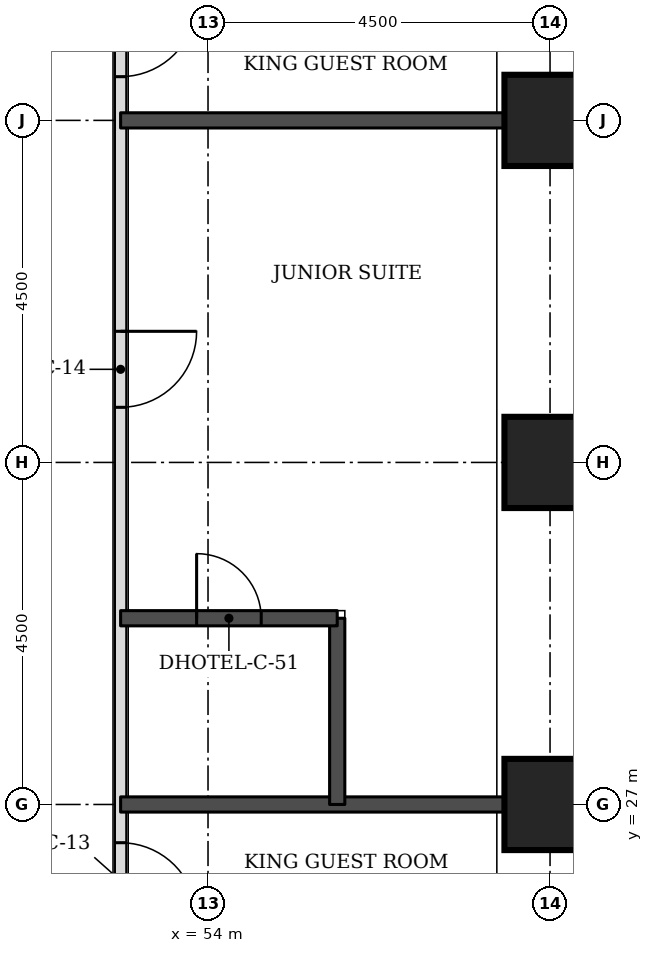
"""IFC4 building model, lengths in metres.
Left out: names, types, materials, properties, quantities, classifications, styles, units other than length and angle.
Written with IfcOpenShell. Run it as: python <this file> out.ifc"""

import sys

from ifc_helpers import new_model, si_unit, direction, frame, frame_2d, origin, origin_2d, place, context, subcontext, project, spatial, rectangle, extrude, element, fill, save


model = new_model("IFC4")
c1 = context("Model", 3, precision=1e-05, world=origin(), true_north=direction((0.0, 1.0)))
c2 = subcontext(c1, "Body", "Model", "MODEL_VIEW")
j1 = project(units=[si_unit("LENGTHUNIT", "METRE"), si_unit("PLANEANGLEUNIT", "RADIAN")], contexts=[c1])
p1 = place(None, origin())
s1 = spatial("IfcSite", under=j1, at=p1, CompositionType="ELEMENT")
p2 = place(p1, origin())
s2 = spatial("IfcBuilding", under=s1, at=p2, CompositionType="ELEMENT")
p3 = place(p2, frame((0.0, 0.0, 33.0)))
s3 = spatial("IfcBuildingStorey", under=s2, at=p3, CompositionType="ELEMENT", Elevation=33.0)
for number, where, z_axis, x_axis in (
    (1, (58.5, 27.0, 0.0), (0.0, 0.0, 1.0), (1.0, 0.0, 0.0)),
    (2, (58.5, 31.5, 0.0), (0.0, 0.0, 1.0), (1.0, 0.0, 0.0)),
    (3, (58.5, 36.0, 0.0), (0.0, 0.0, 1.0), (1.0, 0.0, 0.0)),
):
    element("IfcColumn", number, at=place(p3, frame(where, z_axis=z_axis, x_axis=x_axis)), inside=s3, PredefinedType="COLUMN", context=c2, shape_type="SweptSolid", body=[
        extrude(rectangle(XDim=1.2, YDim=1.2, at=origin_2d()), origin(), (0.0, 0.0, 1.0), 3.3),
    ])
p4 = place(p3, frame((52.85, 25.15, 0.0), z_axis=(0.0, 0.0, 1.0), x_axis=(0.0, 1.0, 0.0)))
e4 = element("IfcWall", 4, at=p4, inside=s3, PredefinedType="PARTITIONING", context=c2, shape_type="SweptSolid", body=[
    extrude(rectangle(XDim=22.35, YDim=0.15, at=frame_2d((11.175, 0.0))), origin(), (0.0, 0.0, 1.0), 3.08),
])
p5 = place(p4, frame((0.347, 0.0, 0.0)))
e5 = element("IfcOpeningElement", 5, at=p5, cuts=e4, PredefinedType="OPENING", context=c2, shape_type="SweptSolid", body=[
    extrude(rectangle(XDim=1.0, YDim=2.1, at=frame_2d((0.5, 1.05))), frame((0.0, 0.085, 0.0), z_axis=(0.0, -1.0, 0.0), x_axis=(1.0, 0.0, 0.0)), (0.0, 0.0, 1.0), 0.17),
])
p6 = place(p4, frame((7.075, 0.0, 0.0)))
e6 = element("IfcOpeningElement", 6, at=p6, cuts=e4, PredefinedType="OPENING", context=c2, shape_type="SweptSolid", body=[
    extrude(rectangle(XDim=1.0, YDim=2.1, at=frame_2d((0.5, 1.05))), frame((0.0, 0.085, 0.0), z_axis=(0.0, -1.0, 0.0), x_axis=(1.0, 0.0, 0.0)), (0.0, 0.0, 1.0), 0.17),
])
p7 = place(p4, frame((11.425, 0.0, 0.0)))
e7 = element("IfcOpeningElement", 7, at=p7, cuts=e4, PredefinedType="OPENING", context=c2, shape_type="SweptSolid", body=[
    extrude(rectangle(XDim=1.0, YDim=2.1, at=frame_2d((0.5, 1.05))), frame((0.0, 0.085, 0.0), z_axis=(0.0, -1.0, 0.0), x_axis=(1.0, 0.0, 0.0)), (0.0, 0.0, 1.0), 0.17),
])
p8 = place(p4, frame((17.15, 0.0, 0.0)))
e8 = element("IfcOpeningElement", 8, at=p8, cuts=e4, PredefinedType="OPENING", context=c2, shape_type="SweptSolid", body=[
    extrude(rectangle(XDim=0.9, YDim=2.1, at=frame_2d((0.45, 1.05))), frame((0.0, 0.085, 0.0), z_axis=(0.0, -1.0, 0.0), x_axis=(1.0, 0.0, 0.0)), (0.0, 0.0, 1.0), 0.17),
])
p9 = place(p3, frame((52.85, 27.0, 0.0), z_axis=(0.0, 0.0, 1.0), x_axis=(1.0, 0.0, 0.0)))
e9 = element("IfcWall", 9, at=p9, inside=s3, PredefinedType="SOLIDWALL", context=c2, shape_type="SweptSolid", body=[
    extrude(rectangle(XDim=5.05, YDim=0.2, at=frame_2d((2.525, 0.0))), origin(), (0.0, 0.0, 1.0), 3.08),
])
p10 = place(p3, frame((55.7, 27.0, 0.0), z_axis=(0.0, 0.0, 1.0), x_axis=(0.0, 1.0, 0.0)))
e10 = element("IfcWall", 10, at=p10, inside=s3, PredefinedType="SOLIDWALL", context=c2, shape_type="SweptSolid", body=[
    extrude(rectangle(XDim=2.45, YDim=0.2, at=frame_2d((1.225, 0.0))), origin(), (0.0, 0.0, 1.0), 3.08),
])
p11 = place(p3, frame((52.85, 29.45, 0.0), z_axis=(0.0, 0.0, 1.0), x_axis=(1.0, 0.0, 0.0)))
e11 = element("IfcWall", 11, at=p11, inside=s3, PredefinedType="SOLIDWALL", context=c2, shape_type="SweptSolid", body=[
    extrude(rectangle(XDim=2.85, YDim=0.2, at=frame_2d((1.425, 0.0))), origin(), (0.0, 0.0, 1.0), 3.08),
])
p12 = place(p11, frame((1.0, 0.0, 0.0)))
e12 = element("IfcOpeningElement", 12, at=p12, cuts=e11, PredefinedType="OPENING", context=c2, shape_type="SweptSolid", body=[
    extrude(rectangle(XDim=0.85, YDim=2.1, at=frame_2d((0.425, 1.05))), frame((0.0, 0.11, 0.0), z_axis=(0.0, -1.0, 0.0), x_axis=(1.0, 0.0, 0.0)), (0.0, 0.0, 1.0), 0.22),
])
p13 = place(p3, frame((52.85, 36.0, 0.0), z_axis=(0.0, 0.0, 1.0), x_axis=(1.0, 0.0, 0.0)))
e13 = element("IfcWall", 13, at=p13, inside=s3, PredefinedType="SOLIDWALL", context=c2, shape_type="SweptSolid", body=[
    extrude(rectangle(XDim=5.05, YDim=0.2, at=frame_2d((2.525, 0.0))), origin(), (0.0, 0.0, 1.0), 3.08),
])
p14 = place(p5, frame((1.0, 0.0, 0.0), z_axis=(0.0, 0.0, 1.0), x_axis=(-1.0, 0.0, 0.0)))
e14 = element("IfcDoor", 14, at=p14, inside=s3, OperationType="SINGLE_SWING_RIGHT", PredefinedType="DOOR", context=c2, shape_type="SweptSolid", body=[
    extrude(rectangle(XDim=1.0, YDim=2.1, at=frame_2d((0.5, 1.05))), frame((0.0, 0.025, 0.0), z_axis=(0.0, -1.0, 0.0), x_axis=(1.0, 0.0, 0.0)), (0.0, 0.0, 1.0), 0.05),
])
fill(e5, e14)
p15 = place(p6, frame((1.0, 0.0, 0.0), z_axis=(0.0, 0.0, 1.0), x_axis=(-1.0, 0.0, 0.0)))
e15 = element("IfcDoor", 15, at=p15, inside=s3, OperationType="SINGLE_SWING_LEFT", PredefinedType="DOOR", context=c2, shape_type="SweptSolid", body=[
    extrude(rectangle(XDim=1.0, YDim=2.1, at=frame_2d((0.5, 1.05))), frame((0.0, 0.025, 0.0), z_axis=(0.0, -1.0, 0.0), x_axis=(1.0, 0.0, 0.0)), (0.0, 0.0, 1.0), 0.05),
])
fill(e6, e15)
p16 = place(p12, origin())
e16 = element("IfcDoor", 16, at=p16, inside=s3, OperationType="SINGLE_SWING_LEFT", PredefinedType="DOOR", context=c2, shape_type="SweptSolid", body=[
    extrude(rectangle(XDim=0.85, YDim=2.1, at=frame_2d((0.425, 1.05))), frame((0.0, 0.025, 0.0), z_axis=(0.0, -1.0, 0.0), x_axis=(1.0, 0.0, 0.0)), (0.0, 0.0, 1.0), 0.05),
])
fill(e12, e16)
p17 = place(p7, frame((1.0, 0.0, 0.0), z_axis=(0.0, 0.0, 1.0), x_axis=(-1.0, 0.0, 0.0)))
e17 = element("IfcDoor", 17, at=p17, inside=s3, OperationType="SINGLE_SWING_LEFT", PredefinedType="DOOR", context=c2, shape_type="SweptSolid", body=[
    extrude(rectangle(XDim=1.0, YDim=2.1, at=frame_2d((0.5, 1.05))), frame((0.0, 0.025, 0.0), z_axis=(0.0, -1.0, 0.0), x_axis=(1.0, 0.0, 0.0)), (0.0, 0.0, 1.0), 0.05),
])
fill(e7, e17)
save(model, sys.argv[1])
